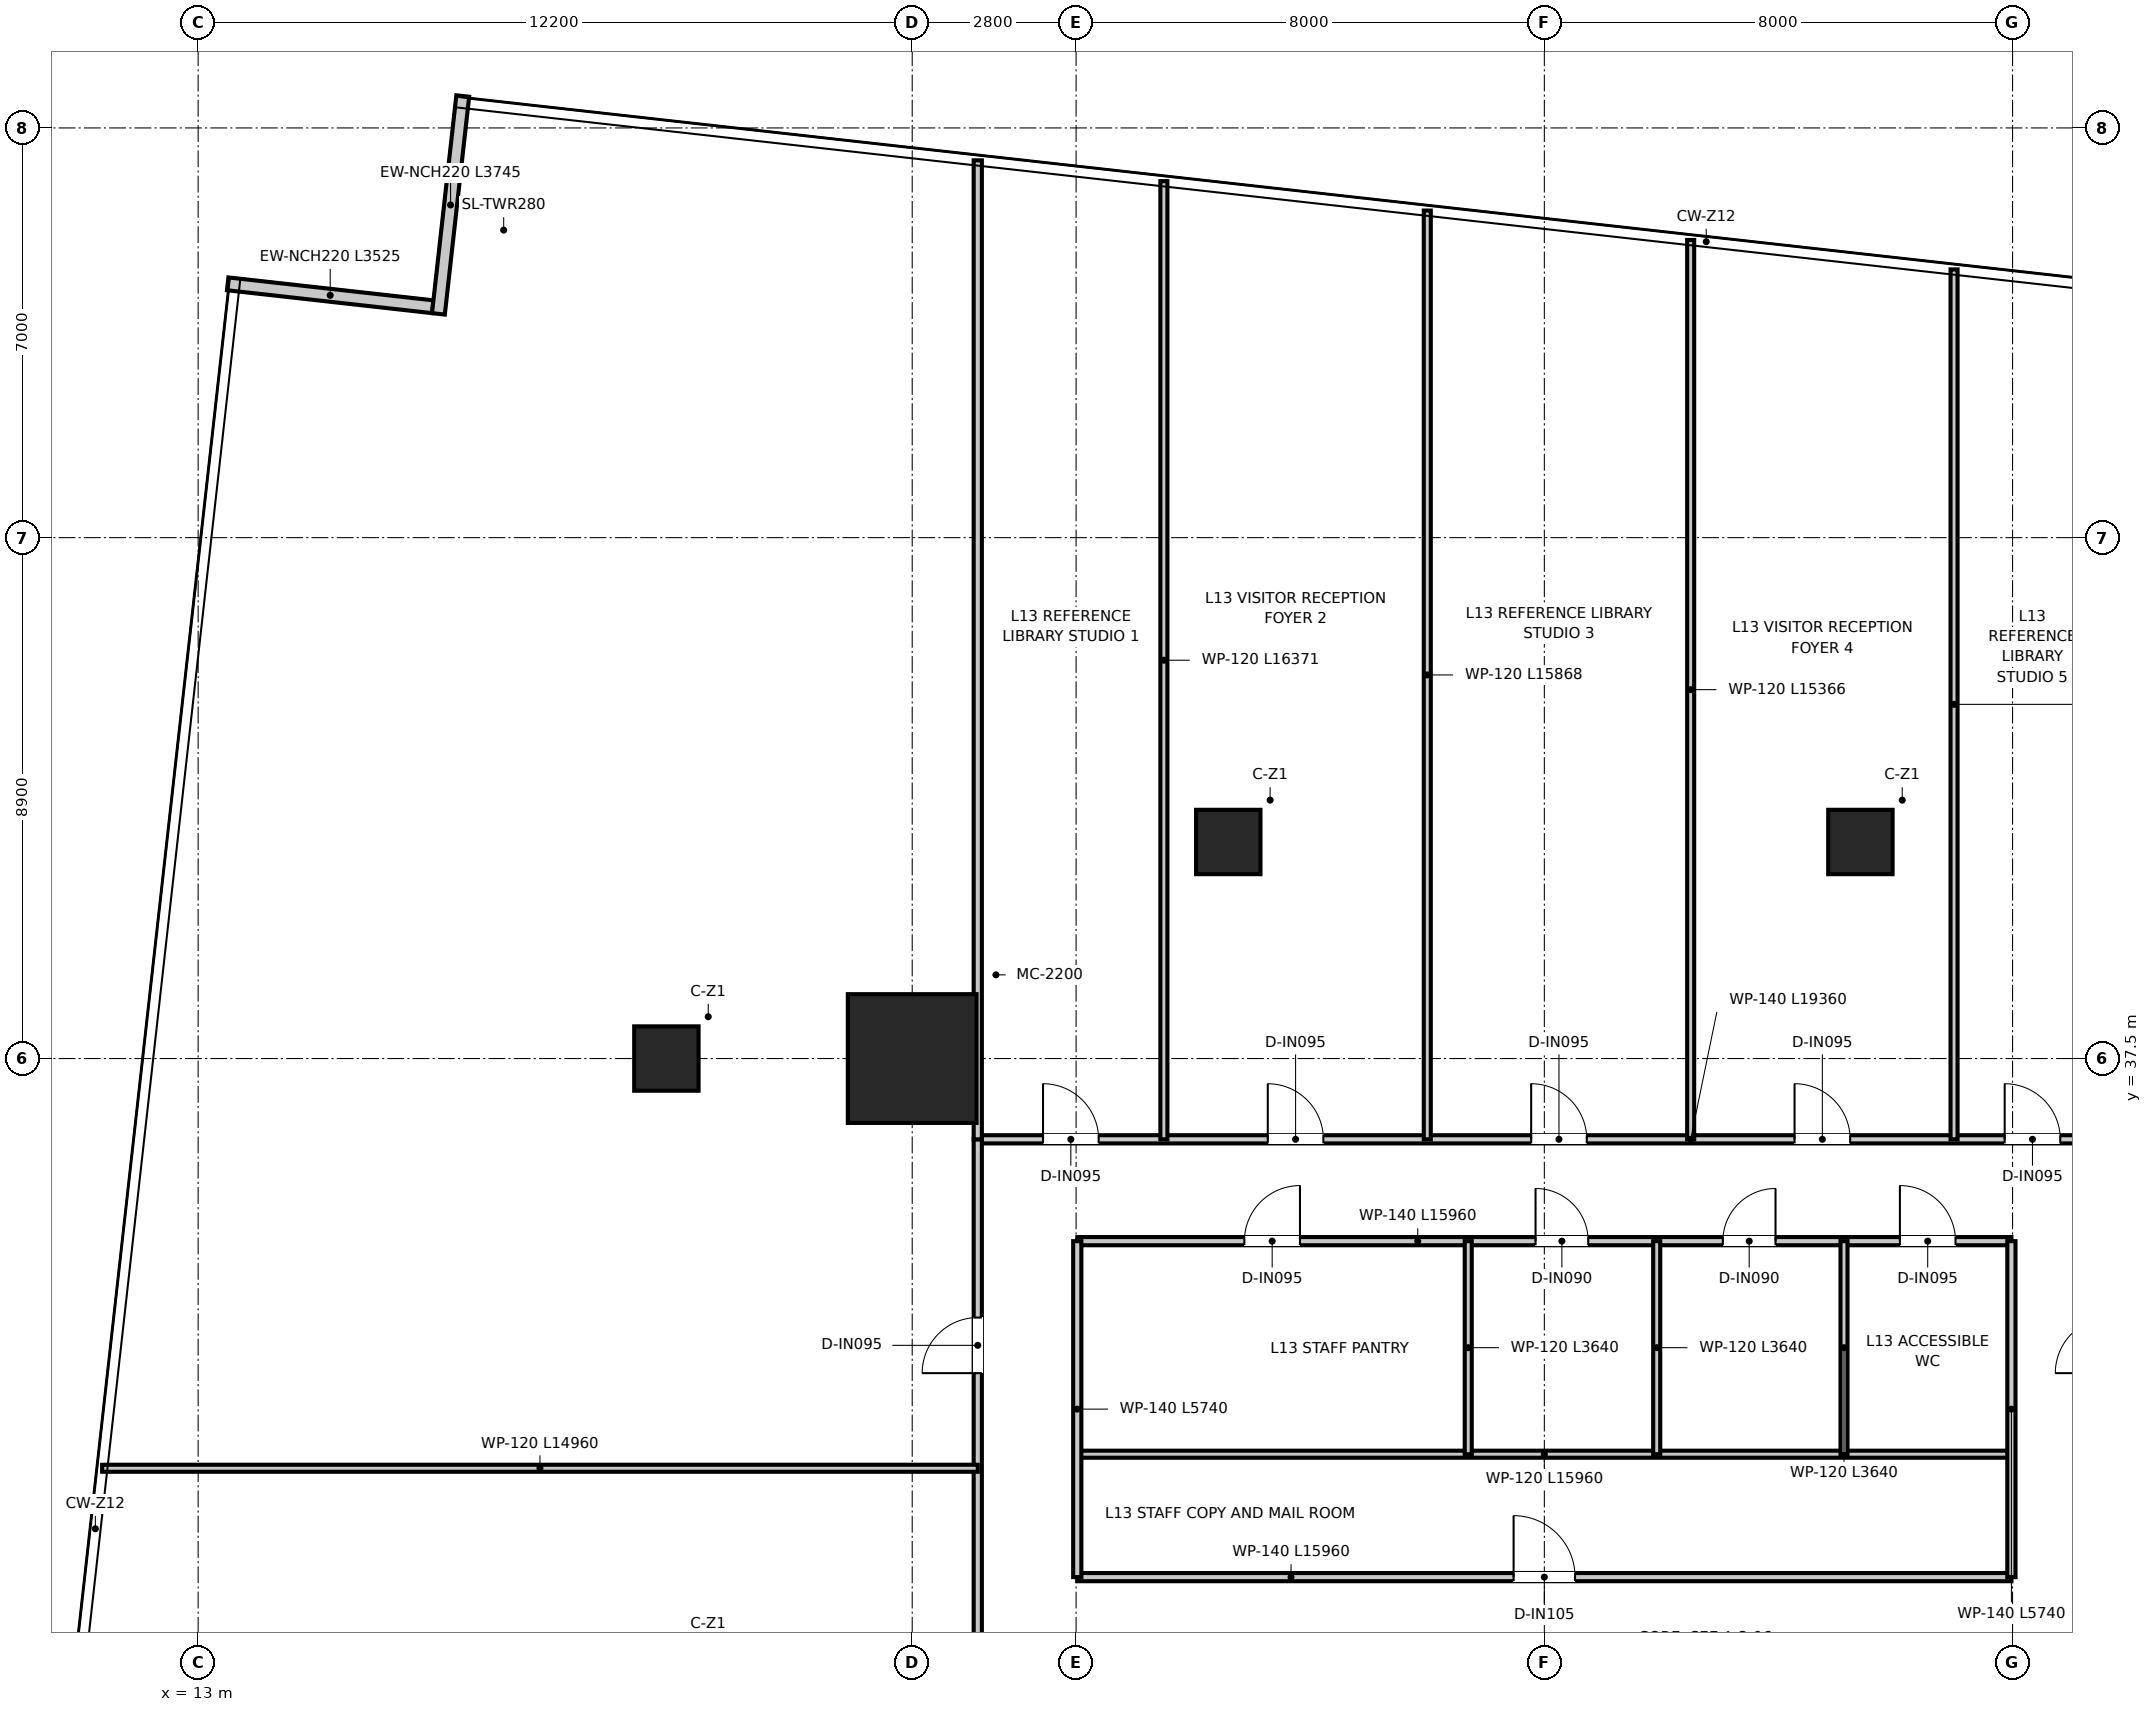
"""IFC4 building model, lengths in metres.
Left out: names, types, materials, properties, quantities, classifications, styles, units other than length and angle.
Written with IfcOpenShell. Run it as: python <this file> out.ifc"""

import sys

from ifc_helpers import new_model, si_unit, direction, frame, frame_2d, origin, origin_2d, place, context, subcontext, project, spatial, rectangle, extrude, source, transform, mapped, element, fill, save


model = new_model("IFC4")
c1 = context("Model", 3, precision=1e-05, world=origin(), true_north=direction((0.0, 1.0)))
c2 = subcontext(c1, "Body", "Model", "MODEL_VIEW")
j1 = project(units=[si_unit("LENGTHUNIT", "METRE"), si_unit("PLANEANGLEUNIT", "RADIAN")], contexts=[c1])
p1 = place(None, origin())
s1 = spatial("IfcSite", under=j1, at=p1, CompositionType="ELEMENT")
p2 = place(p1, origin())
s2 = spatial("IfcBuilding", under=s1, at=p2, CompositionType="ELEMENT")
p3 = place(p2, frame((0.0, 0.0, 56.6)))
s3 = spatial("IfcBuildingStorey", under=s2, at=p3, CompositionType="ELEMENT", Elevation=56.6)
m1 = source(origin(), c2, "Body", "SweptSolid", [
    extrude(rectangle(XDim=2.2, YDim=2.2, at=origin_2d()), origin(), (0.0, 0.0, 1.0), 3.95),
])
p4 = place(p3, frame((25.2, 37.5, 0.0), z_axis=(0.0, 0.0, 1.0), x_axis=(1.0, 0.0, 0.0)))
e1 = element("IfcColumn", 1, at=p4, inside=s3, PredefinedType="USERDEFINED", context=c2, shape_type="MappedRepresentation", body=[
    mapped(m1, transform((0.0, 0.0, 0.0), x_axis=(1.0, 0.0, 0.0), y_axis=(0.0, 1.0, 0.0), z_axis=(0.0, 0.0, 1.0), scale=1.0)),
])
m2 = source(origin(), c2, "Body", "SweptSolid", [
    extrude(rectangle(XDim=1.1, YDim=1.1, at=origin_2d()), origin(), (0.0, 0.0, 1.0), 3.95),
])
for number, where, z_axis, x_axis in (
    (2, (21.0, 37.5, 0.0), (0.0, 0.0, 1.0), (1.0, 0.0, 0.0)),
    (3, (30.6, 41.2, 0.0), (0.0, 0.0, 1.0), (1.0, 0.0, 0.0)),
    (4, (41.4, 41.2, 0.0), (0.0, 0.0, 1.0), (1.0, 0.0, 0.0)),
):
    element("IfcColumn", number, at=place(p3, frame(where, z_axis=z_axis, x_axis=x_axis)), inside=s3, PredefinedType="COLUMN", context=c2, shape_type="MappedRepresentation", body=[
        mapped(m2, transform((0.0, 0.0, 0.0), x_axis=(1.0, 0.0, 0.0), y_axis=(0.0, 1.0, 0.0), z_axis=(0.0, 0.0, 1.0), scale=1.0)),
    ])
p5 = place(p3, frame((17.008, 50.345, 0.0), z_axis=(0.0, 0.0, 1.0), x_axis=(-0.993817675948, 0.111024443135, 0.0)))
e5 = element("IfcWall", 5, at=p5, inside=s3, PredefinedType="ELEMENTEDWALL", context=c2, shape_type="SweptSolid", body=[
    extrude(rectangle(XDim=3.525, YDim=0.22, at=frame_2d((1.762, 0.0))), origin(), (0.0, 0.0, 1.0), 3.67),
])
p6 = place(p3, frame((17.521, 53.945, 0.0), z_axis=(0.0, 0.0, 1.0), x_axis=(-0.111082600583, -0.99381117716, 0.0)))
e6 = element("IfcWall", 6, at=p6, inside=s3, PredefinedType="ELEMENTEDWALL", context=c2, shape_type="SweptSolid", body=[
    extrude(rectangle(XDim=3.745, YDim=0.22, at=frame_2d((1.873, 0.0))), origin(), (0.0, 0.0, 1.0), 3.67),
])
p7 = place(p3, frame((28.02, 28.64, 0.0), z_axis=(0.0, 0.0, 1.0), x_axis=(1.0, 0.0, 0.0)))
e7 = element("IfcWall", 7, at=p7, inside=s3, PredefinedType="PARTITIONING", context=c2, shape_type="SweptSolid", body=[
    extrude(rectangle(XDim=15.96, YDim=0.14, at=frame_2d((7.98, 0.0))), origin(), (0.0, 0.0, 1.0), 3.08),
])
p8 = place(p7, frame((7.455, 0.0, 0.0)))
e8 = element("IfcOpeningElement", 8, at=p8, cuts=e7, PredefinedType="OPENING", context=c2, shape_type="SweptSolid", body=[
    extrude(rectangle(XDim=1.05, YDim=2.15, at=frame_2d((0.525, 1.075))), frame((0.0, 0.08, 0.0), z_axis=(0.0, -1.0, 0.0), x_axis=(1.0, 0.0, 0.0)), (0.0, 0.0, 1.0), 0.16),
])
p9 = place(p3, frame((28.02, 30.74, 0.0), z_axis=(0.0, 0.0, 1.0), x_axis=(1.0, 0.0, 0.0)))
e9 = element("IfcWall", 9, at=p9, inside=s3, PredefinedType="PARTITIONING", context=c2, shape_type="SweptSolid", body=[
    extrude(rectangle(XDim=15.96, YDim=0.12, at=frame_2d((7.98, 0.0))), origin(), (0.0, 0.0, 1.0), 3.08),
])
p10 = place(p3, frame((28.02, 34.38, 0.0), z_axis=(0.0, 0.0, 1.0), x_axis=(1.0, 0.0, 0.0)))
e10 = element("IfcWall", 10, at=p10, inside=s3, PredefinedType="PARTITIONING", context=c2, shape_type="SweptSolid", body=[
    extrude(rectangle(XDim=15.96, YDim=0.14, at=frame_2d((7.98, 0.0))), origin(), (0.0, 0.0, 1.0), 3.08),
])
p11 = place(p10, frame((7.83, 0.0, 0.0)))
e11 = element("IfcOpeningElement", 11, at=p11, cuts=e10, PredefinedType="OPENING", context=c2, shape_type="SweptSolid", body=[
    extrude(rectangle(XDim=0.9, YDim=2.1, at=frame_2d((0.45, 1.05))), frame((0.0, 0.08, 0.0), z_axis=(0.0, -1.0, 0.0), x_axis=(1.0, 0.0, 0.0)), (0.0, 0.0, 1.0), 0.16),
])
p12 = place(p10, frame((11.03, 0.0, 0.0)))
e12 = element("IfcOpeningElement", 12, at=p12, cuts=e10, PredefinedType="OPENING", context=c2, shape_type="SweptSolid", body=[
    extrude(rectangle(XDim=0.9, YDim=2.1, at=frame_2d((0.45, 1.05))), frame((0.0, 0.08, 0.0), z_axis=(0.0, -1.0, 0.0), x_axis=(1.0, 0.0, 0.0)), (0.0, 0.0, 1.0), 0.16),
])
p13 = place(p10, frame((14.055, 0.0, 0.0)))
e13 = element("IfcOpeningElement", 13, at=p13, cuts=e10, PredefinedType="OPENING", context=c2, shape_type="SweptSolid", body=[
    extrude(rectangle(XDim=0.95, YDim=2.1, at=frame_2d((0.475, 1.05))), frame((0.0, 0.08, 0.0), z_axis=(0.0, -1.0, 0.0), x_axis=(1.0, 0.0, 0.0)), (0.0, 0.0, 1.0), 0.16),
])
p14 = place(p10, frame((2.855, 0.0, 0.0)))
e14 = element("IfcOpeningElement", 14, at=p14, cuts=e10, PredefinedType="OPENING", context=c2, shape_type="SweptSolid", body=[
    extrude(rectangle(XDim=0.95, YDim=2.1, at=frame_2d((0.475, 1.05))), frame((0.0, 0.08, 0.0), z_axis=(0.0, -1.0, 0.0), x_axis=(1.0, 0.0, 0.0)), (0.0, 0.0, 1.0), 0.16),
])
for number, where, z_axis, x_axis in (
    (15, (28.02, 28.64, 0.0), (0.0, 0.0, 1.0), (0.0, 1.0, 0.0)),
    (16, (43.98, 28.64, 0.0), (0.0, 0.0, 1.0), (0.0, 1.0, 0.0)),
):
    element("IfcWall", number, at=place(p3, frame(where, z_axis=z_axis, x_axis=x_axis)), inside=s3, PredefinedType="PARTITIONING", context=c2, shape_type="SweptSolid", body=[
        extrude(rectangle(XDim=5.74, YDim=0.14, at=frame_2d((2.87, 0.0))), origin(), (0.0, 0.0, 1.0), 3.22),
    ])
for number, where, z_axis, x_axis in (
    (17, (37.92, 30.74, 0.0), (0.0, 0.0, 1.0), (0.0, 1.0, 0.0)),
    (18, (41.12, 30.74, 0.0), (0.0, 0.0, 1.0), (0.0, 1.0, 0.0)),
    (19, (34.7, 30.74, 0.0), (0.0, 0.0, 1.0), (0.0, 1.0, 0.0)),
):
    element("IfcWall", number, at=place(p3, frame(where, z_axis=z_axis, x_axis=x_axis)), inside=s3, PredefinedType="PARTITIONING", context=c2, shape_type="SweptSolid", body=[
        extrude(rectangle(XDim=3.64, YDim=0.12, at=frame_2d((1.82, 0.0))), origin(), (0.0, 0.0, 1.0), 3.12),
    ])
p15 = place(p3, frame((26.32, 36.12, 0.0), z_axis=(0.0, 0.0, 1.0), x_axis=(1.0, 0.0, 0.0)))
e20 = element("IfcWall", 20, at=p15, inside=s3, PredefinedType="PARTITIONING", context=c2, shape_type="SweptSolid", body=[
    extrude(rectangle(XDim=19.36, YDim=0.14, at=frame_2d((9.68, 0.0))), origin(), (0.0, 0.0, 1.0), 3.08),
])
p16 = place(p15, frame((1.115, 0.0, 0.0)))
e21 = element("IfcOpeningElement", 21, at=p16, cuts=e20, PredefinedType="OPENING", context=c2, shape_type="SweptSolid", body=[
    extrude(rectangle(XDim=0.95, YDim=2.1, at=frame_2d((0.475, 1.05))), frame((0.0, 0.08, 0.0), z_axis=(0.0, -1.0, 0.0), x_axis=(1.0, 0.0, 0.0)), (0.0, 0.0, 1.0), 0.16),
])
p17 = place(p15, frame((4.955, 0.0, 0.0)))
e22 = element("IfcOpeningElement", 22, at=p17, cuts=e20, PredefinedType="OPENING", context=c2, shape_type="SweptSolid", body=[
    extrude(rectangle(XDim=0.95, YDim=2.1, at=frame_2d((0.475, 1.05))), frame((0.0, 0.08, 0.0), z_axis=(0.0, -1.0, 0.0), x_axis=(1.0, 0.0, 0.0)), (0.0, 0.0, 1.0), 0.16),
])
p18 = place(p15, frame((9.455, 0.0, 0.0)))
e23 = element("IfcOpeningElement", 23, at=p18, cuts=e20, PredefinedType="OPENING", context=c2, shape_type="SweptSolid", body=[
    extrude(rectangle(XDim=0.95, YDim=2.1, at=frame_2d((0.475, 1.05))), frame((0.0, 0.08, 0.0), z_axis=(0.0, -1.0, 0.0), x_axis=(1.0, 0.0, 0.0)), (0.0, 0.0, 1.0), 0.16),
])
p19 = place(p15, frame((13.955, 0.0, 0.0)))
e24 = element("IfcOpeningElement", 24, at=p19, cuts=e20, PredefinedType="OPENING", context=c2, shape_type="SweptSolid", body=[
    extrude(rectangle(XDim=0.95, YDim=2.1, at=frame_2d((0.475, 1.05))), frame((0.0, 0.08, 0.0), z_axis=(0.0, -1.0, 0.0), x_axis=(1.0, 0.0, 0.0)), (0.0, 0.0, 1.0), 0.16),
])
p20 = place(p15, frame((17.545, 0.0, 0.0)))
e25 = element("IfcOpeningElement", 25, at=p20, cuts=e20, PredefinedType="OPENING", context=c2, shape_type="SweptSolid", body=[
    extrude(rectangle(XDim=0.95, YDim=2.1, at=frame_2d((0.475, 1.05))), frame((0.0, 0.08, 0.0), z_axis=(0.0, -1.0, 0.0), x_axis=(1.0, 0.0, 0.0)), (0.0, 0.0, 1.0), 0.16),
])
p21 = place(p3, frame((26.32, 10.5, 0.0), z_axis=(0.0, 0.0, 1.0), x_axis=(0.0, 1.0, 0.0)))
e26 = element("IfcWall", 26, at=p21, inside=s3, PredefinedType="PARTITIONING", context=c2, shape_type="SweptSolid", body=[
    extrude(rectangle(XDim=25.62, YDim=0.14, at=frame_2d((12.81, 0.0))), origin(), (0.0, 0.0, 1.0), 2.97),
])
p22 = place(p21, frame((9.025, 0.0, 0.0)))
e27 = element("IfcOpeningElement", 27, at=p22, cuts=e26, PredefinedType="OPENING", context=c2, shape_type="SweptSolid", body=[
    extrude(rectangle(XDim=0.95, YDim=2.1, at=frame_2d((0.475, 1.05))), frame((0.0, 0.08, 0.0), z_axis=(0.0, -1.0, 0.0), x_axis=(1.0, 0.0, 0.0)), (0.0, 0.0, 1.0), 0.16),
])
p23 = place(p21, frame((15.525, 0.0, 0.0)))
e28 = element("IfcOpeningElement", 28, at=p23, cuts=e26, PredefinedType="OPENING", context=c2, shape_type="SweptSolid", body=[
    extrude(rectangle(XDim=0.95, YDim=2.1, at=frame_2d((0.475, 1.05))), frame((0.0, 0.08, 0.0), z_axis=(0.0, -1.0, 0.0), x_axis=(1.0, 0.0, 0.0)), (0.0, 0.0, 1.0), 0.16),
])
p24 = place(p21, frame((21.625, 0.0, 0.0)))
e29 = element("IfcOpeningElement", 29, at=p24, cuts=e26, PredefinedType="OPENING", context=c2, shape_type="SweptSolid", body=[
    extrude(rectangle(XDim=0.95, YDim=2.1, at=frame_2d((0.475, 1.05))), frame((0.0, 0.08, 0.0), z_axis=(0.0, -1.0, 0.0), x_axis=(1.0, 0.0, 0.0)), (0.0, 0.0, 1.0), 0.16),
])
p25 = place(p3, frame((26.32, 36.12, 0.0), z_axis=(0.0, 0.0, 1.0), x_axis=(0.0, 1.0, 0.0)))
e30 = element("IfcWall", 30, at=p25, inside=s3, PredefinedType="PARTITIONING", context=c2, shape_type="SweptSolid", body=[
    extrude(rectangle(XDim=16.726, YDim=0.14, at=frame_2d((8.363, 0.0))), origin(), (0.0, 0.0, 1.0), 2.97),
])
p26 = place(p3, frame((29.5, 36.12, 0.0), z_axis=(0.0, 0.0, 1.0), x_axis=(0.0, 1.0, 0.0)))
e31 = element("IfcWall", 31, at=p26, inside=s3, PredefinedType="PARTITIONING", context=c2, shape_type="SweptSolid", body=[
    extrude(rectangle(XDim=16.371, YDim=0.12, at=frame_2d((8.186, 0.0))), origin(), (0.0, 0.0, 1.0), 2.97),
])
p27 = place(p3, frame((34.0, 36.12, 0.0), z_axis=(0.0, 0.0, 1.0), x_axis=(0.0, 1.0, 0.0)))
e32 = element("IfcWall", 32, at=p27, inside=s3, PredefinedType="PARTITIONING", context=c2, shape_type="SweptSolid", body=[
    extrude(rectangle(XDim=15.868, YDim=0.12, at=frame_2d((7.934, 0.0))), origin(), (0.0, 0.0, 1.0), 2.97),
])
p28 = place(p3, frame((38.5, 36.12, 0.0), z_axis=(0.0, 0.0, 1.0), x_axis=(0.0, 1.0, 0.0)))
e33 = element("IfcWall", 33, at=p28, inside=s3, PredefinedType="PARTITIONING", context=c2, shape_type="SweptSolid", body=[
    extrude(rectangle(XDim=15.365, YDim=0.12, at=frame_2d((7.683, 0.0))), origin(), (0.0, 0.0, 1.0), 2.97),
])
p29 = place(p3, frame((43.0, 36.12, 0.0), z_axis=(0.0, 0.0, 1.0), x_axis=(0.0, 1.0, 0.0)))
e34 = element("IfcWall", 34, at=p29, inside=s3, PredefinedType="PARTITIONING", context=c2, shape_type="SweptSolid", body=[
    extrude(rectangle(XDim=14.863, YDim=0.12, at=frame_2d((7.431, 0.0))), origin(), (0.0, 0.0, 1.0), 2.97),
])
p30 = place(p3, frame((11.36, 30.5, 0.0), z_axis=(0.0, 0.0, 1.0), x_axis=(1.0, 0.0, 0.0)))
e35 = element("IfcWall", 35, at=p30, inside=s3, PredefinedType="PARTITIONING", context=c2, shape_type="SweptSolid", body=[
    extrude(rectangle(XDim=14.96, YDim=0.12, at=frame_2d((7.48, 0.0))), origin(), (0.0, 0.0, 1.0), 2.97),
])
p31 = place(p8, origin())
e36 = element("IfcDoor", 36, at=p31, inside=s3, OperationType="SINGLE_SWING_LEFT", PredefinedType="DOOR", context=c2, shape_type="SweptSolid", body=[
    extrude(rectangle(XDim=1.05, YDim=2.15, at=frame_2d((0.525, 1.075))), frame((0.0, 0.025, 0.0), z_axis=(0.0, -1.0, 0.0), x_axis=(1.0, 0.0, 0.0)), (0.0, 0.0, 1.0), 0.05),
])
fill(e8, e36)
p32 = place(p11, origin())
e37 = element("IfcDoor", 37, at=p32, inside=s3, OperationType="SINGLE_SWING_LEFT", PredefinedType="DOOR", context=c2, shape_type="SweptSolid", body=[
    extrude(rectangle(XDim=0.9, YDim=2.1, at=frame_2d((0.45, 1.05))), frame((0.0, 0.025, 0.0), z_axis=(0.0, -1.0, 0.0), x_axis=(1.0, 0.0, 0.0)), (0.0, 0.0, 1.0), 0.05),
])
fill(e11, e37)
p33 = place(p12, origin())
e38 = element("IfcDoor", 38, at=p33, inside=s3, OperationType="SINGLE_SWING_RIGHT", PredefinedType="DOOR", context=c2, shape_type="SweptSolid", body=[
    extrude(rectangle(XDim=0.9, YDim=2.1, at=frame_2d((0.45, 1.05))), frame((0.0, 0.025, 0.0), z_axis=(0.0, -1.0, 0.0), x_axis=(1.0, 0.0, 0.0)), (0.0, 0.0, 1.0), 0.05),
])
fill(e12, e38)
p34 = place(p13, origin())
e39 = element("IfcDoor", 39, at=p34, inside=s3, OperationType="SINGLE_SWING_LEFT", PredefinedType="DOOR", context=c2, shape_type="SweptSolid", body=[
    extrude(rectangle(XDim=0.95, YDim=2.1, at=frame_2d((0.475, 1.05))), frame((0.0, 0.025, 0.0), z_axis=(0.0, -1.0, 0.0), x_axis=(1.0, 0.0, 0.0)), (0.0, 0.0, 1.0), 0.05),
])
fill(e13, e39)
p35 = place(p14, origin())
e40 = element("IfcDoor", 40, at=p35, inside=s3, OperationType="SINGLE_SWING_RIGHT", PredefinedType="DOOR", context=c2, shape_type="SweptSolid", body=[
    extrude(rectangle(XDim=0.95, YDim=2.1, at=frame_2d((0.475, 1.05))), frame((0.0, 0.025, 0.0), z_axis=(0.0, -1.0, 0.0), x_axis=(1.0, 0.0, 0.0)), (0.0, 0.0, 1.0), 0.05),
])
fill(e14, e40)
p36 = place(p16, origin())
e41 = element("IfcDoor", 41, at=p36, inside=s3, OperationType="SINGLE_SWING_LEFT", PredefinedType="DOOR", context=c2, shape_type="SweptSolid", body=[
    extrude(rectangle(XDim=0.95, YDim=2.1, at=frame_2d((0.475, 1.05))), frame((0.0, 0.025, 0.0), z_axis=(0.0, -1.0, 0.0), x_axis=(1.0, 0.0, 0.0)), (0.0, 0.0, 1.0), 0.05),
])
fill(e21, e41)
p37 = place(p17, origin())
e42 = element("IfcDoor", 42, at=p37, inside=s3, OperationType="SINGLE_SWING_LEFT", PredefinedType="DOOR", context=c2, shape_type="SweptSolid", body=[
    extrude(rectangle(XDim=0.95, YDim=2.1, at=frame_2d((0.475, 1.05))), frame((0.0, 0.025, 0.0), z_axis=(0.0, -1.0, 0.0), x_axis=(1.0, 0.0, 0.0)), (0.0, 0.0, 1.0), 0.05),
])
fill(e22, e42)
p38 = place(p18, origin())
e43 = element("IfcDoor", 43, at=p38, inside=s3, OperationType="SINGLE_SWING_LEFT", PredefinedType="DOOR", context=c2, shape_type="SweptSolid", body=[
    extrude(rectangle(XDim=0.95, YDim=2.1, at=frame_2d((0.475, 1.05))), frame((0.0, 0.025, 0.0), z_axis=(0.0, -1.0, 0.0), x_axis=(1.0, 0.0, 0.0)), (0.0, 0.0, 1.0), 0.05),
])
fill(e23, e43)
p39 = place(p19, origin())
e44 = element("IfcDoor", 44, at=p39, inside=s3, OperationType="SINGLE_SWING_LEFT", PredefinedType="DOOR", context=c2, shape_type="SweptSolid", body=[
    extrude(rectangle(XDim=0.95, YDim=2.1, at=frame_2d((0.475, 1.05))), frame((0.0, 0.025, 0.0), z_axis=(0.0, -1.0, 0.0), x_axis=(1.0, 0.0, 0.0)), (0.0, 0.0, 1.0), 0.05),
])
fill(e24, e44)
p40 = place(p20, origin())
e45 = element("IfcDoor", 45, at=p40, inside=s3, OperationType="SINGLE_SWING_LEFT", PredefinedType="DOOR", context=c2, shape_type="SweptSolid", body=[
    extrude(rectangle(XDim=0.95, YDim=2.1, at=frame_2d((0.475, 1.05))), frame((0.0, 0.025, 0.0), z_axis=(0.0, -1.0, 0.0), x_axis=(1.0, 0.0, 0.0)), (0.0, 0.0, 1.0), 0.05),
])
fill(e25, e45)
p41 = place(p24, origin())
e46 = element("IfcDoor", 46, at=p41, inside=s3, OperationType="SINGLE_SWING_LEFT", PredefinedType="DOOR", context=c2, shape_type="SweptSolid", body=[
    extrude(rectangle(XDim=0.95, YDim=2.1, at=frame_2d((0.475, 1.05))), frame((0.0, 0.025, 0.0), z_axis=(0.0, -1.0, 0.0), x_axis=(1.0, 0.0, 0.0)), (0.0, 0.0, 1.0), 0.05),
])
fill(e29, e46)
save(model, sys.argv[1])
